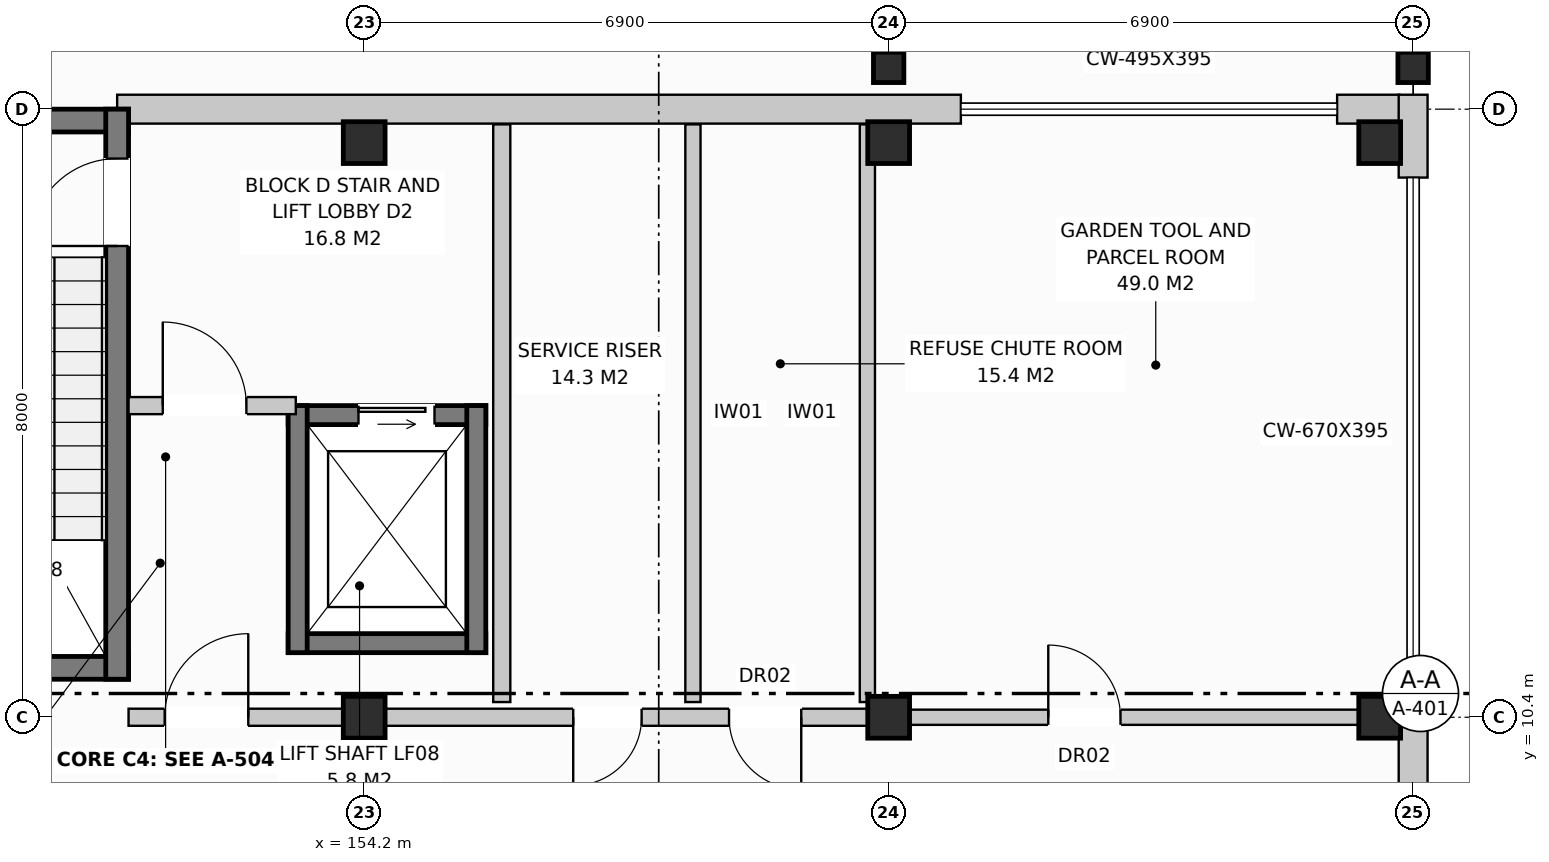
"""IFC4 building model, lengths in metres.
Left out: names, types, materials, properties, quantities, classifications, styles, units other than length and angle.
Written with IfcOpenShell. Run it as: python <this file> out.ifc"""

import sys

from ifc_helpers import new_model, si_unit, direction, frame, frame_2d, origin, origin_with_axes, origin_2d, place, context, subcontext, project, spatial, rectangle, extrude, element, fill, save


model = new_model("IFC4")
c1 = context("Model", 3, precision=1e-05, world=origin(), true_north=direction((0.0, 1.0)))
c2 = subcontext(c1, "Body", "Model", "MODEL_VIEW")
j1 = project(units=[si_unit("LENGTHUNIT", "METRE"), si_unit("PLANEANGLEUNIT", "RADIAN")], contexts=[c1])
p1 = place(None, origin())
s1 = spatial("IfcSite", under=j1, at=p1, CompositionType="ELEMENT")
p2 = place(p1, origin())
s2 = spatial("IfcBuilding", under=s1, at=p2, CompositionType="ELEMENT")
p3 = place(p2, origin())
s3 = spatial("IfcBuildingStorey", under=s2, at=p3, CompositionType="ELEMENT", Elevation=0.0)
for number, where, z_axis, x_axis in (
    (1, (154.2, 10.4, 0.0), (0.0, 0.0, 1.0), (1.0, 0.0, 0.0)),
    (2, (154.2, 17.96, 0.0), (0.0, 0.0, 1.0), (1.0, 0.0, 0.0)),
    (3, (161.1, 10.4, 0.0), (0.0, 0.0, 1.0), (1.0, 0.0, 0.0)),
    (4, (161.1, 17.96, 0.0), (0.0, 0.0, 1.0), (1.0, 0.0, 0.0)),
    (5, (167.56, 10.4, 0.0), (0.0, 0.0, 1.0), (1.0, 0.0, 0.0)),
    (6, (167.56, 17.96, 0.0), (0.0, 0.0, 1.0), (1.0, 0.0, 0.0)),
):
    element("IfcColumn", number, at=place(p3, frame(where, z_axis=z_axis, x_axis=x_axis)), inside=s3, PredefinedType="COLUMN", context=c2, shape_type="SweptSolid", body=[
        extrude(rectangle(XDim=0.55, YDim=0.55, at=origin_2d()), origin(), (0.0, 0.0, 1.0), 4.4),
    ])
for number, where, z_axis, x_axis in (
    (7, (161.1, 18.95, 0.0), (0.0, 0.0, 1.0), (1.0, 0.0, 0.0)),
    (8, (168.0, 18.95, 0.0), (0.0, 0.0, 1.0), (1.0, 0.0, 0.0)),
):
    element("IfcColumn", number, at=place(p3, frame(where, z_axis=z_axis, x_axis=x_axis)), inside=s3, PredefinedType="COLUMN", context=c2, shape_type="SweptSolid", body=[
        extrude(rectangle(XDim=0.4, YDim=0.4, at=origin_2d()), origin(), (0.0, 0.0, 1.0), 4.4),
    ])
p4 = place(p3, frame((150.95, 18.4, 0.0), z_axis=(0.0, 0.0, 1.0), x_axis=(1.0, 0.0, 0.0)))
e9 = element("IfcWall", 9, at=p4, inside=s3, PredefinedType="STANDARD", context=c2, shape_type="SweptSolid", body=[
    extrude(rectangle(XDim=11.1, YDim=0.38, at=frame_2d((5.55, 0.0))), origin(), (0.0, 0.0, 1.0), 4.12),
])
p5 = place(p3, frame((167.0, 18.4, 0.0), z_axis=(0.0, 0.0, 1.0), x_axis=(1.0, 0.0, 0.0)))
e10 = element("IfcWall", 10, at=p5, inside=s3, PredefinedType="STANDARD", context=c2, shape_type="SweptSolid", body=[
    extrude(rectangle(XDim=0.82, YDim=0.38, at=frame_2d((0.41, 0.0))), origin(), (0.0, 0.0, 1.0), 4.12),
])
p6 = place(p3, frame((168.0, 7.6, 0.0), z_axis=(0.0, 0.0, 1.0), x_axis=(0.0, 1.0, 0.0)))
e11 = element("IfcWall", 11, at=p6, inside=s3, PredefinedType="STANDARD", context=c2, shape_type="SweptSolid", body=[
    extrude(rectangle(XDim=3.2, YDim=0.38, at=frame_2d((1.6, 0.0))), origin(), (0.0, 0.0, 1.0), 4.12),
])
p7 = place(p3, frame((168.0, 17.5, 0.0), z_axis=(0.0, 0.0, 1.0), x_axis=(0.0, 1.0, 0.0)))
e12 = element("IfcWall", 12, at=p7, inside=s3, PredefinedType="STANDARD", context=c2, shape_type="SweptSolid", body=[
    extrude(rectangle(XDim=1.09, YDim=0.38, at=frame_2d((0.545, 0.0))), origin(), (0.0, 0.0, 1.0), 4.12),
])
p8 = place(p3, frame((168.0, 18.95, 0.0), z_axis=(0.0, 0.0, 1.0), x_axis=(0.0, 1.0, 0.0)))
e13 = element("IfcWall", 13, at=p8, inside=s3, PredefinedType="STANDARD", context=c2, shape_type="SweptSolid", body=[
    extrude(rectangle(XDim=6.85, YDim=0.31, at=frame_2d((3.425, 0.0))), origin(), (0.0, 0.0, 1.0), 3.68),
])
p9 = place(p8, frame((1.85, 0.0, 0.0)))
e14 = element("IfcOpeningElement", 14, at=p9, cuts=e13, PredefinedType="OPENING", context=c2, shape_type="SweptSolid", body=[
    extrude(rectangle(XDim=4.0, YDim=2.8, at=frame_2d((2.0, 1.4))), frame((0.0, 0.167, 0.0), z_axis=(0.0, -1.0, 0.0), x_axis=(1.0, 0.0, 0.0)), (0.0, 0.0, 1.0), 0.334),
])
p10 = place(p3, frame((147.6, 18.25, 0.0), z_axis=(0.0, 0.0, 1.0), x_axis=(1.0, 0.0, 0.0)))
e15 = element("IfcWall", 15, at=p10, inside=s3, PredefinedType="SHEAR", context=c2, shape_type="SweptSolid", body=[
    extrude(rectangle(XDim=3.5, YDim=0.3, at=frame_2d((1.75, 0.0))), origin(), (0.0, 0.0, 1.0), 4.12),
])
p11 = place(p10, frame((1.05, 0.0, 0.0)))
e16 = element("IfcOpeningElement", 16, at=p11, cuts=e15, PredefinedType="OPENING", context=c2, shape_type="SweptSolid", body=[
    extrude(rectangle(XDim=1.4, YDim=2.25, at=frame_2d((0.7, 1.125))), frame((0.0, 0.162, 0.0), z_axis=(0.0, -1.0, 0.0), x_axis=(1.0, 0.0, 0.0)), (0.0, 0.0, 1.0), 0.324),
])
p12 = place(p3, frame((147.6, 11.05, 0.0), z_axis=(0.0, 0.0, 1.0), x_axis=(1.0, 0.0, 0.0)))
e17 = element("IfcWall", 17, at=p12, inside=s3, PredefinedType="SHEAR", context=c2, shape_type="SweptSolid", body=[
    extrude(rectangle(XDim=3.5, YDim=0.3, at=frame_2d((1.75, 0.0))), origin(), (0.0, 0.0, 1.0), 4.12),
])
p13 = place(p3, frame((150.95, 10.9, 0.0), z_axis=(0.0, 0.0, 1.0), x_axis=(0.0, 1.0, 0.0)))
e18 = element("IfcWall", 18, at=p13, inside=s3, PredefinedType="SHEAR", context=c2, shape_type="SweptSolid", body=[
    extrude(rectangle(XDim=7.5, YDim=0.3, at=frame_2d((3.75, 0.0))), origin(), (0.0, 0.0, 1.0), 4.12),
])
p14 = place(p13, frame((5.7, 0.0, 0.0)))
e19 = element("IfcOpeningElement", 19, at=p14, cuts=e18, PredefinedType="OPENING", context=c2, shape_type="SweptSolid", body=[
    extrude(rectangle(XDim=1.15, YDim=2.15, at=frame_2d((0.575, 1.075))), frame((0.0, 0.162, 0.0), z_axis=(0.0, -1.0, 0.0), x_axis=(1.0, 0.0, 0.0)), (0.0, 0.0, 1.0), 0.324),
])
p15 = place(p3, frame((153.2, 14.375, 0.0), z_axis=(0.0, 0.0, 1.0), x_axis=(1.0, 0.0, 0.0)))
e20 = element("IfcWall", 20, at=p15, inside=s3, PredefinedType="SHEAR", context=c2, shape_type="SweptSolid", body=[
    extrude(rectangle(XDim=2.6, YDim=0.25, at=frame_2d((1.3, 0.0))), origin(), (0.0, 0.0, 1.0), 4.12),
])
p16 = place(p15, frame((0.925, 0.0, 0.0)))
e21 = element("IfcOpeningElement", 21, at=p16, cuts=e20, PredefinedType="OPENING", context=c2, shape_type="SweptSolid", body=[
    extrude(rectangle(XDim=1.0, YDim=2.1, at=frame_2d((0.5, 1.05))), frame((0.0, 0.137, 0.0), z_axis=(0.0, -1.0, 0.0), x_axis=(1.0, 0.0, 0.0)), (0.0, 0.0, 1.0), 0.274),
])
p17 = place(p3, frame((153.2, 11.375, 0.0), z_axis=(0.0, 0.0, 1.0), x_axis=(1.0, 0.0, 0.0)))
e22 = element("IfcWall", 22, at=p17, inside=s3, PredefinedType="SHEAR", context=c2, shape_type="SweptSolid", body=[
    extrude(rectangle(XDim=2.6, YDim=0.25, at=frame_2d((1.3, 0.0))), origin(), (0.0, 0.0, 1.0), 4.12),
])
for number, where, z_axis, x_axis in (
    (23, (153.325, 11.25, 0.0), (0.0, 0.0, 1.0), (0.0, 1.0, 0.0)),
    (24, (155.675, 11.25, 0.0), (0.0, 0.0, 1.0), (0.0, 1.0, 0.0)),
):
    element("IfcWall", number, at=place(p3, frame(where, z_axis=z_axis, x_axis=x_axis)), inside=s3, PredefinedType="SHEAR", context=c2, shape_type="SweptSolid", body=[
        extrude(rectangle(XDim=3.25, YDim=0.25, at=frame_2d((1.625, 0.0))), origin(), (0.0, 0.0, 1.0), 4.12),
    ])
p18 = place(p3, frame((156.01, 10.6, 0.0), z_axis=(0.0, 0.0, 1.0), x_axis=(0.0, 1.0, 0.0)))
e25 = element("IfcWall", 25, at=p18, inside=s3, PredefinedType="PARTITIONING", context=c2, shape_type="SweptSolid", body=[
    extrude(rectangle(XDim=7.6, YDim=0.225, at=frame_2d((3.8, 0.0))), origin(), (0.0, 0.0, 1.0), 3.79),
])
p19 = place(p3, frame((151.1, 14.5, 0.0), z_axis=(0.0, 0.0, 1.0), x_axis=(1.0, 0.0, 0.0)))
e26 = element("IfcWall", 26, at=p19, inside=s3, PredefinedType="PARTITIONING", context=c2, shape_type="SweptSolid", body=[
    extrude(rectangle(XDim=2.2, YDim=0.225, at=frame_2d((1.1, 0.0))), origin(), (0.0, 0.0, 1.0), 4.12),
])
p20 = place(p19, frame((0.45, 0.0, 0.0)))
e27 = element("IfcOpeningElement", 27, at=p20, cuts=e26, PredefinedType="OPENING", context=c2, shape_type="SweptSolid", body=[
    extrude(rectangle(XDim=1.1, YDim=2.15, at=frame_2d((0.55, 1.075))), frame((0.0, 0.125, 0.0), z_axis=(0.0, -1.0, 0.0), x_axis=(1.0, 0.0, 0.0)), (0.0, 0.0, 1.0), 0.249),
])
p21 = place(p3, frame((158.525, 10.6, 0.0), z_axis=(0.0, 0.0, 1.0), x_axis=(0.0, 1.0, 0.0)))
e28 = element("IfcWall", 28, at=p21, inside=s3, PredefinedType="PARTITIONING", context=c2, shape_type="SweptSolid", body=[
    extrude(rectangle(XDim=7.6, YDim=0.2, at=frame_2d((3.8, 0.0))), origin(), (0.0, 0.0, 1.0), 3.79),
])
p22 = place(p3, frame((160.82, 10.6, 0.0), z_axis=(0.0, 0.0, 1.0), x_axis=(0.0, 1.0, 0.0)))
e29 = element("IfcWall", 29, at=p22, inside=s3, PredefinedType="PARTITIONING", context=c2, shape_type="SweptSolid", body=[
    extrude(rectangle(XDim=7.6, YDim=0.2, at=frame_2d((3.8, 0.0))), origin(), (0.0, 0.0, 1.0), 3.56),
])
p23 = place(p3, frame((151.1, 10.4, 0.0), z_axis=(0.0, 0.0, 1.0), x_axis=(1.0, 0.0, 0.0)))
e30 = element("IfcWall", 30, at=p23, inside=s3, PredefinedType="PARTITIONING", context=c2, shape_type="SweptSolid", body=[
    extrude(rectangle(XDim=10.0, YDim=0.225, at=frame_2d((5.0, 0.0))), origin(), (0.0, 0.0, 1.0), 3.56),
])
p24 = place(p23, frame((0.475, 0.0, 0.0)))
e31 = element("IfcOpeningElement", 31, at=p24, cuts=e30, PredefinedType="OPENING", context=c2, shape_type="SweptSolid", body=[
    extrude(rectangle(XDim=1.1, YDim=2.15, at=frame_2d((0.55, 1.075))), frame((0.0, 0.125, 0.0), z_axis=(0.0, -1.0, 0.0), x_axis=(1.0, 0.0, 0.0)), (0.0, 0.0, 1.0), 0.249),
])
p25 = place(p23, frame((5.85, 0.0, 0.0)))
e32 = element("IfcOpeningElement", 32, at=p25, cuts=e30, PredefinedType="OPENING", context=c2, shape_type="SweptSolid", body=[
    extrude(rectangle(XDim=0.9, YDim=2.1, at=frame_2d((0.45, 1.05))), frame((0.0, 0.125, 0.0), z_axis=(0.0, -1.0, 0.0), x_axis=(1.0, 0.0, 0.0)), (0.0, 0.0, 1.0), 0.249),
])
p26 = place(p23, frame((7.9, 0.0, 0.0)))
e33 = element("IfcOpeningElement", 33, at=p26, cuts=e30, PredefinedType="OPENING", context=c2, shape_type="SweptSolid", body=[
    extrude(rectangle(XDim=0.95, YDim=2.15, at=frame_2d((0.475, 1.075))), frame((0.0, 0.125, 0.0), z_axis=(0.0, -1.0, 0.0), x_axis=(1.0, 0.0, 0.0)), (0.0, 0.0, 1.0), 0.249),
])
p27 = place(p3, frame((161.3, 10.4, 0.0), z_axis=(0.0, 0.0, 1.0), x_axis=(1.0, 0.0, 0.0)))
e34 = element("IfcWall", 34, at=p27, inside=s3, PredefinedType="PARTITIONING", context=c2, shape_type="SweptSolid", body=[
    extrude(rectangle(XDim=6.45, YDim=0.2, at=frame_2d((3.225, 0.0))), origin(), (0.0, 0.0, 1.0), 3.56),
])
p28 = place(p27, frame((1.9, 0.0, 0.0)))
e35 = element("IfcOpeningElement", 35, at=p28, cuts=e34, PredefinedType="OPENING", context=c2, shape_type="SweptSolid", body=[
    extrude(rectangle(XDim=0.95, YDim=2.15, at=frame_2d((0.475, 1.075))), frame((0.0, 0.112, 0.0), z_axis=(0.0, -1.0, 0.0), x_axis=(1.0, 0.0, 0.0)), (0.0, 0.0, 1.0), 0.224),
])
p29 = place(p14, origin_with_axes())
e36 = element("IfcDoor", 36, at=p29, inside=s3, OperationType="SINGLE_SWING_LEFT", PredefinedType="DOOR", context=c2, shape_type="SweptSolid", body=[
    extrude(rectangle(XDim=1.15, YDim=2.15, at=frame_2d((0.575, 1.075))), frame((0.0, 0.025, 0.0), z_axis=(0.0, -1.0, 0.0), x_axis=(1.0, 0.0, 0.0)), (0.0, 0.0, 1.0), 0.05),
])
fill(e19, e36)
p30 = place(p16, origin_with_axes())
e37 = element("IfcDoor", 37, at=p30, inside=s3, OperationType="SLIDING_TO_LEFT", PredefinedType="DOOR", context=c2, shape_type="SweptSolid", body=[
    extrude(rectangle(XDim=1.0, YDim=2.1, at=frame_2d((0.5, 1.05))), frame((0.0, 0.025, 0.0), z_axis=(0.0, -1.0, 0.0), x_axis=(1.0, 0.0, 0.0)), (0.0, 0.0, 1.0), 0.05),
])
fill(e21, e37)
p31 = place(p20, origin_with_axes())
e38 = element("IfcDoor", 38, at=p31, inside=s3, OperationType="SINGLE_SWING_LEFT", PredefinedType="DOOR", context=c2, shape_type="SweptSolid", body=[
    extrude(rectangle(XDim=1.1, YDim=2.15, at=frame_2d((0.55, 1.075))), frame((0.0, 0.025, 0.0), z_axis=(0.0, -1.0, 0.0), x_axis=(1.0, 0.0, 0.0)), (0.0, 0.0, 1.0), 0.05),
])
fill(e27, e38)
p32 = place(p24, origin_with_axes())
e39 = element("IfcDoor", 39, at=p32, inside=s3, OperationType="SINGLE_SWING_RIGHT", PredefinedType="DOOR", context=c2, shape_type="SweptSolid", body=[
    extrude(rectangle(XDim=1.1, YDim=2.15, at=frame_2d((0.55, 1.075))), frame((0.0, 0.025, 0.0), z_axis=(0.0, -1.0, 0.0), x_axis=(1.0, 0.0, 0.0)), (0.0, 0.0, 1.0), 0.05),
])
fill(e31, e39)
p33 = place(p25, frame((0.9, 0.0, 0.0), z_axis=(0.0, 0.0, 1.0), x_axis=(-1.0, 0.0, 0.0)))
e40 = element("IfcDoor", 40, at=p33, inside=s3, OperationType="SINGLE_SWING_LEFT", PredefinedType="DOOR", context=c2, shape_type="SweptSolid", body=[
    extrude(rectangle(XDim=0.9, YDim=2.1, at=frame_2d((0.45, 1.05))), frame((0.0, 0.025, 0.0), z_axis=(0.0, -1.0, 0.0), x_axis=(1.0, 0.0, 0.0)), (0.0, 0.0, 1.0), 0.05),
])
fill(e32, e40)
p34 = place(p26, frame((0.95, 0.0, 0.0), z_axis=(0.0, 0.0, 1.0), x_axis=(-1.0, 0.0, 0.0)))
e41 = element("IfcDoor", 41, at=p34, inside=s3, OperationType="SINGLE_SWING_RIGHT", PredefinedType="DOOR", context=c2, shape_type="SweptSolid", body=[
    extrude(rectangle(XDim=0.95, YDim=2.15, at=frame_2d((0.475, 1.075))), frame((0.0, 0.025, 0.0), z_axis=(0.0, -1.0, 0.0), x_axis=(1.0, 0.0, 0.0)), (0.0, 0.0, 1.0), 0.05),
])
fill(e33, e41)
p35 = place(p28, origin_with_axes())
e42 = element("IfcDoor", 42, at=p35, inside=s3, OperationType="SINGLE_SWING_LEFT", PredefinedType="DOOR", context=c2, shape_type="SweptSolid", body=[
    extrude(rectangle(XDim=0.95, YDim=2.15, at=frame_2d((0.475, 1.075))), frame((0.0, 0.025, 0.0), z_axis=(0.0, -1.0, 0.0), x_axis=(1.0, 0.0, 0.0)), (0.0, 0.0, 1.0), 0.05),
])
fill(e35, e42)
save(model, sys.argv[1])
